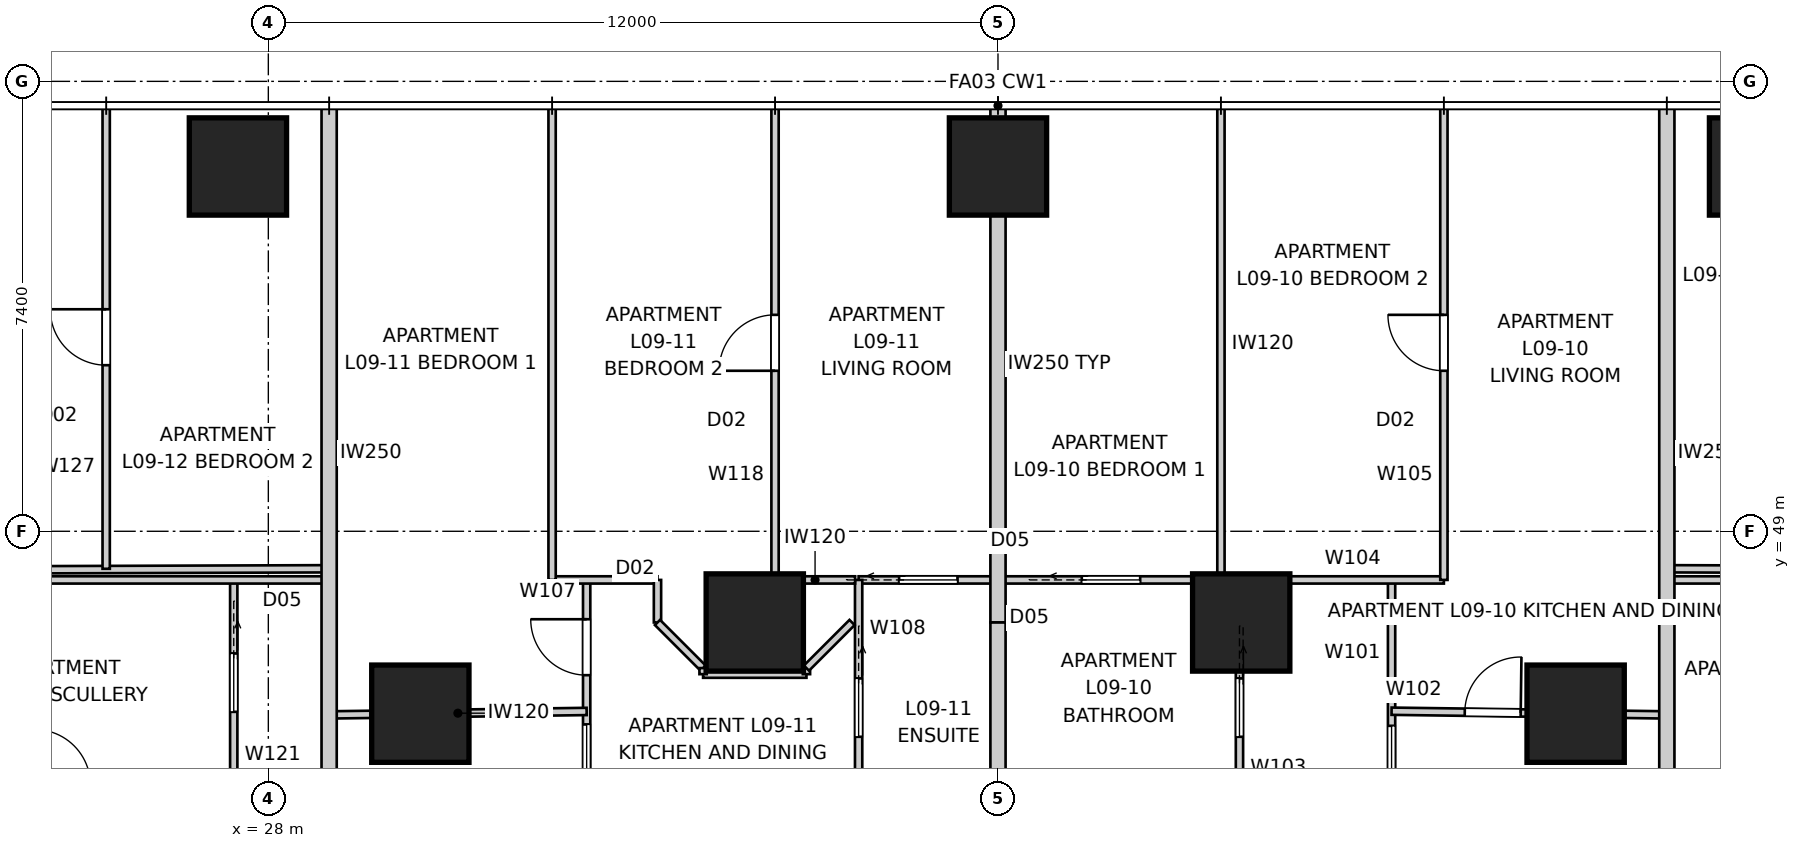
"""IFC4 building model, lengths in metres.
Left out: names, types, materials, properties, quantities, classifications, styles, units other than length and angle.
Written with IfcOpenShell. Run it as: python <this file> out.ifc"""

import sys

from ifc_helpers import new_model, si_unit, direction, frame, frame_2d, origin, origin_2d, place, context, subcontext, project, spatial, rectangle, extrude, element, fill, save


model = new_model("IFC4")
c1 = context("Model", 3, precision=1e-05, world=origin(), true_north=direction((0.0, 1.0)))
c2 = subcontext(c1, "Body", "Model", "MODEL_VIEW")
j1 = project(units=[si_unit("LENGTHUNIT", "METRE"), si_unit("PLANEANGLEUNIT", "RADIAN")], contexts=[c1])
p1 = place(None, origin())
s1 = spatial("IfcSite", under=j1, at=p1, CompositionType="ELEMENT")
p2 = place(p1, origin())
s2 = spatial("IfcBuilding", under=s1, at=p2, CompositionType="ELEMENT")
p3 = place(p2, frame((0.0, 0.0, 35.4)))
s3 = spatial("IfcBuildingStorey", under=s2, at=p3, CompositionType="ELEMENT", Elevation=35.4)
for number, where, z_axis, x_axis in (
    (1, (52.5, 55.0, 0.0), (0.0, 0.0, 1.0), (1.0, 0.0, 0.0)),
    (2, (40.0, 55.0, 0.0), (0.0, 0.0, 1.0), (1.0, 0.0, 0.0)),
    (3, (27.5, 55.0, 0.0), (0.0, 0.0, 1.0), (1.0, 0.0, 0.0)),
    (4, (49.5, 46.0, 0.0), (0.0, 0.0, 1.0), (1.0, 0.0, 0.0)),
    (5, (44.0, 47.5, 0.0), (0.0, 0.0, 1.0), (1.0, 0.0, 0.0)),
    (6, (36.0, 47.5, 0.0), (0.0, 0.0, 1.0), (1.0, 0.0, 0.0)),
    (7, (30.5, 46.0, 0.0), (0.0, 0.0, 1.0), (1.0, 0.0, 0.0)),
):
    element("IfcColumn", number, at=place(p3, frame(where, z_axis=z_axis, x_axis=x_axis)), inside=s3, PredefinedType="COLUMN", context=c2, shape_type="SweptSolid", body=[
        extrude(rectangle(XDim=1.6, YDim=1.6, at=origin_2d()), origin(), (0.0, 0.0, 1.0), 3.4),
    ])
for number, where, z_axis, x_axis in (
    (8, (51.0, 56.0, 0.0), (0.0, 0.0, 1.0), (0.0, -1.0, 0.0)),
    (9, (29.0, 56.0, 0.0), (0.0, 0.0, 1.0), (0.0, -1.0, 0.0)),
):
    element("IfcWall", number, at=place(p3, frame(where, z_axis=z_axis, x_axis=x_axis)), inside=s3, PredefinedType="PARTITIONING", context=c2, shape_type="SweptSolid", body=[
        extrude(rectangle(XDim=11.44, YDim=0.25, at=frame_2d((5.72, 0.0))), origin(), (0.0, 0.0, 1.0), 3.25),
    ])
p4 = place(p3, frame((40.0, 56.0, 0.0), z_axis=(0.0, 0.0, 1.0), x_axis=(0.0, -1.0, 0.0)))
e10 = element("IfcWall", 10, at=p4, inside=s3, PredefinedType="PARTITIONING", context=c2, shape_type="SweptSolid", body=[
    extrude(rectangle(XDim=8.5, YDim=0.25, at=frame_2d((4.25, 0.0))), origin(), (0.0, 0.0, 1.0), 3.25),
])
p5 = place(p3, frame((40.0, 47.5, 0.0), z_axis=(0.0, 0.0, 1.0), x_axis=(0.0, -1.0, 0.0)))
e11 = element("IfcWall", 11, at=p5, inside=s3, PredefinedType="PARTITIONING", context=c2, shape_type="SweptSolid", body=[
    extrude(rectangle(XDim=2.94, YDim=0.25, at=frame_2d((1.47, 0.0))), origin(), (0.0, 0.0, 1.0), 2.796),
])
p6 = place(p3, frame((51.0, 48.2, 0.0), z_axis=(0.0, 0.0, 1.0), x_axis=(1.0, 0.0, 0.0)))
e12 = element("IfcWall", 12, at=p6, inside=s3, PredefinedType="PARTITIONING", context=c2, shape_type="SweptSolid", body=[
    extrude(rectangle(XDim=7.2, YDim=0.12, at=frame_2d((3.6, 0.0))), origin(), (0.0, 0.0, 1.0), 3.25),
])
p7 = place(p3, frame((51.0, 48.383, 0.0), z_axis=(0.0, 0.0, 1.0), x_axis=(0.9999944038, -0.003345499915, 0.0)))
e13 = element("IfcWall", 13, at=p7, inside=s3, PredefinedType="PARTITIONING", context=c2, shape_type="SweptSolid", body=[
    extrude(rectangle(XDim=14.96, YDim=0.12, at=frame_2d((7.48, 0.0))), origin(), (0.0, 0.0, 1.0), 3.25),
])
p8 = place(p7, frame((12.515, 0.0, 0.0)))
e14 = element("IfcOpeningElement", 14, at=p8, cuts=e13, PredefinedType="OPENING", context=c2, shape_type="SweptSolid", body=[
    extrude(rectangle(XDim=0.92, YDim=2.34, at=frame_2d((0.46, 1.17))), frame((0.0, 0.07, 0.0), z_axis=(0.0, -1.0, 0.0), x_axis=(1.0, 0.0, 0.0)), (0.0, 0.0, 1.0), 0.14),
])
p9 = place(p7, frame((8.732, 0.0, 0.0)))
e15 = element("IfcOpeningElement", 15, at=p9, cuts=e13, PredefinedType="OPENING", context=c2, shape_type="SweptSolid", body=[
    extrude(rectangle(XDim=0.92, YDim=2.34, at=frame_2d((0.46, 1.17))), frame((0.0, 0.07, 0.0), z_axis=(0.0, -1.0, 0.0), x_axis=(1.0, 0.0, 0.0)), (0.0, 0.0, 1.0), 0.14),
])
p10 = place(p3, frame((46.473, 44.6, 0.0), z_axis=(0.0, 0.0, 1.0), x_axis=(0.0, 1.0, 0.0)))
e16 = element("IfcWall", 16, at=p10, inside=s3, PredefinedType="PARTITIONING", context=c2, shape_type="SweptSolid", body=[
    extrude(rectangle(XDim=3.6, YDim=0.12, at=frame_2d((1.8, 0.0))), origin(), (0.0, 0.0, 1.0), 3.25),
])
p11 = place(p10, frame((0.24, 0.0, 0.0)))
e17 = element("IfcOpeningElement", 17, at=p11, cuts=e16, PredefinedType="OPENING", context=c2, shape_type="SweptSolid", body=[
    extrude(rectangle(XDim=0.96, YDim=2.1, at=frame_2d((0.48, 1.05))), frame((0.0, 0.07, 0.0), z_axis=(0.0, -1.0, 0.0), x_axis=(1.0, 0.0, 0.0)), (0.0, 0.0, 1.0), 0.14),
])
p12 = place(p3, frame((46.473, 46.041, 0.0), z_axis=(0.0, 0.0, 1.0), x_axis=(0.999909127846, -0.013480951408, 0.0)))
e18 = element("IfcWall", 18, at=p12, inside=s3, PredefinedType="PARTITIONING", context=c2, shape_type="SweptSolid", body=[
    extrude(rectangle(XDim=4.528, YDim=0.12, at=frame_2d((2.264, 0.0))), origin(), (0.0, 0.0, 1.0), 2.549),
])
p13 = place(p12, frame((1.204, 0.0, 0.0)))
e19 = element("IfcOpeningElement", 19, at=p13, cuts=e18, PredefinedType="OPENING", context=c2, shape_type="SweptSolid", body=[
    extrude(rectangle(XDim=0.92, YDim=2.34, at=frame_2d((0.46, 1.17))), frame((0.0, 0.07, 0.0), z_axis=(0.0, -1.0, 0.0), x_axis=(1.0, 0.0, 0.0)), (0.0, 0.0, 1.0), 0.14),
])
p14 = place(p3, frame((43.971, 48.2, 0.0), z_axis=(0.0, 0.0, 1.0), x_axis=(0.0, -1.0, 0.0)))
e20 = element("IfcWall", 20, at=p14, inside=s3, PredefinedType="PARTITIONING", context=c2, shape_type="SweptSolid", body=[
    extrude(rectangle(XDim=3.6, YDim=0.12, at=frame_2d((1.8, 0.0))), origin(), (0.0, 0.0, 1.0), 3.25),
])
p15 = place(p14, frame((1.62, 0.0, 0.0)))
e21 = element("IfcOpeningElement", 21, at=p15, cuts=e20, PredefinedType="OPENING", context=c2, shape_type="SweptSolid", body=[
    extrude(rectangle(XDim=0.96, YDim=2.1, at=frame_2d((0.48, 1.05))), frame((0.0, 0.07, 0.0), z_axis=(0.0, -1.0, 0.0), x_axis=(1.0, 0.0, 0.0)), (0.0, 0.0, 1.0), 0.14),
])
p16 = place(p3, frame((37.708, 48.2, 0.0), z_axis=(0.0, 0.0, 1.0), x_axis=(1.0, 0.0, 0.0)))
e22 = element("IfcWall", 22, at=p16, inside=s3, PredefinedType="PARTITIONING", context=c2, shape_type="SweptSolid", body=[
    extrude(rectangle(XDim=9.625, YDim=0.12, at=frame_2d((4.812, 0.0))), origin(), (0.0, 0.0, 1.0), 3.25),
])
p17 = place(p16, frame((0.666, 0.0, 0.0)))
e23 = element("IfcOpeningElement", 23, at=p17, cuts=e22, PredefinedType="OPENING", context=c2, shape_type="SweptSolid", body=[
    extrude(rectangle(XDim=0.96, YDim=2.1, at=frame_2d((0.48, 1.05))), frame((0.0, 0.07, 0.0), z_axis=(0.0, -1.0, 0.0), x_axis=(1.0, 0.0, 0.0)), (0.0, 0.0, 1.0), 0.14),
])
p18 = place(p16, frame((3.67, 0.0, 0.0)))
e24 = element("IfcOpeningElement", 24, at=p18, cuts=e22, PredefinedType="OPENING", context=c2, shape_type="SweptSolid", body=[
    extrude(rectangle(XDim=0.96, YDim=2.1, at=frame_2d((0.48, 1.05))), frame((0.0, 0.07, 0.0), z_axis=(0.0, -1.0, 0.0), x_axis=(1.0, 0.0, 0.0)), (0.0, 0.0, 1.0), 0.14),
])
p19 = place(p3, frame((47.333, 48.2, 0.0), z_axis=(0.0, 0.0, 1.0), x_axis=(0.0, 1.0, 0.0)))
e25 = element("IfcWall", 25, at=p19, inside=s3, PredefinedType="PARTITIONING", context=c2, shape_type="SweptSolid", body=[
    extrude(rectangle(XDim=7.76, YDim=0.12, at=frame_2d((3.88, 0.0))), origin(), (0.0, 0.0, 1.0), 3.25),
])
p20 = place(p19, frame((3.44, 0.0, 0.0)))
e26 = element("IfcOpeningElement", 26, at=p20, cuts=e25, PredefinedType="OPENING", context=c2, shape_type="SweptSolid", body=[
    extrude(rectangle(XDim=0.92, YDim=2.34, at=frame_2d((0.46, 1.17))), frame((0.0, 0.07, 0.0), z_axis=(0.0, -1.0, 0.0), x_axis=(1.0, 0.0, 0.0)), (0.0, 0.0, 1.0), 0.14),
])
p21 = place(p3, frame((43.667, 55.96, 0.0), z_axis=(0.0, 0.0, 1.0), x_axis=(0.0, -1.0, 0.0)))
e27 = element("IfcWall", 27, at=p21, inside=s3, PredefinedType="PARTITIONING", context=c2, shape_type="SweptSolid", body=[
    extrude(rectangle(XDim=7.76, YDim=0.12, at=frame_2d((3.88, 0.0))), origin(), (0.0, 0.0, 1.0), 3.25),
])
p22 = place(p3, frame((33.235, 44.6, 0.0), z_axis=(0.0, 0.0, 1.0), x_axis=(0.0, 1.0, 0.0)))
e28 = element("IfcWall", 28, at=p22, inside=s3, PredefinedType="PARTITIONING", context=c2, shape_type="SweptSolid", body=[
    extrude(rectangle(XDim=3.6, YDim=0.12, at=frame_2d((1.8, 0.0))), origin(), (0.0, 0.0, 1.0), 3.25),
])
p23 = place(p22, frame((2.033, 0.0, 0.0)))
e29 = element("IfcOpeningElement", 29, at=p23, cuts=e28, PredefinedType="OPENING", context=c2, shape_type="SweptSolid", body=[
    extrude(rectangle(XDim=0.92, YDim=2.34, at=frame_2d((0.46, 1.17))), frame((0.0, 0.07, 0.0), z_axis=(0.0, -1.0, 0.0), x_axis=(1.0, 0.0, 0.0)), (0.0, 0.0, 1.0), 0.14),
])
p24 = place(p22, frame((0.263, 0.0, 0.0)))
e30 = element("IfcOpeningElement", 30, at=p24, cuts=e28, PredefinedType="OPENING", context=c2, shape_type="SweptSolid", body=[
    extrude(rectangle(XDim=0.96, YDim=2.1, at=frame_2d((0.48, 1.05))), frame((0.0, 0.07, 0.0), z_axis=(0.0, -1.0, 0.0), x_axis=(1.0, 0.0, 0.0)), (0.0, 0.0, 1.0), 0.14),
])
p25 = place(p3, frame((37.708, 48.2, 0.0), z_axis=(0.0, 0.0, 1.0), x_axis=(0.0, -1.0, 0.0)))
e31 = element("IfcWall", 31, at=p25, inside=s3, PredefinedType="PARTITIONING", context=c2, shape_type="SweptSolid", body=[
    extrude(rectangle(XDim=3.6, YDim=0.12, at=frame_2d((1.8, 0.0))), origin(), (0.0, 0.0, 1.0), 3.25),
])
p26 = place(p25, frame((1.62, 0.0, 0.0)))
e32 = element("IfcOpeningElement", 32, at=p26, cuts=e31, PredefinedType="OPENING", context=c2, shape_type="SweptSolid", body=[
    extrude(rectangle(XDim=0.96, YDim=2.1, at=frame_2d((0.48, 1.05))), frame((0.0, 0.07, 0.0), z_axis=(0.0, -1.0, 0.0), x_axis=(1.0, 0.0, 0.0)), (0.0, 0.0, 1.0), 0.14),
])
p27 = place(p3, frame((32.667, 48.2, 0.0), z_axis=(0.0, 0.0, 1.0), x_axis=(1.0, 0.0, 0.0)))
e33 = element("IfcWall", 33, at=p27, inside=s3, PredefinedType="PARTITIONING", context=c2, shape_type="SweptSolid", body=[
    extrude(rectangle(XDim=1.733, YDim=0.12, at=frame_2d((0.867, 0.0))), origin(), (0.0, 0.0, 1.0), 3.25),
])
p28 = place(p3, frame((34.4, 48.2, 0.0), z_axis=(0.0, 0.0, 1.0), x_axis=(0.0, -1.0, 0.0)))
e34 = element("IfcWall", 34, at=p28, inside=s3, PredefinedType="PARTITIONING", context=c2, shape_type="SweptSolid", body=[
    extrude(rectangle(XDim=0.7, YDim=0.12, at=frame_2d((0.35, 0.0))), origin(), (0.0, 0.0, 1.0), 3.25),
])
p29 = place(p3, frame((34.4, 47.5, 0.0), z_axis=(0.0, 0.0, 1.0), x_axis=(0.707106781187, -0.707106781187, 0.0)))
e35 = element("IfcWall", 35, at=p29, inside=s3, PredefinedType="PARTITIONING", context=c2, shape_type="SweptSolid", body=[
    extrude(rectangle(XDim=1.061, YDim=0.12, at=frame_2d((0.53, 0.0))), origin(), (0.0, 0.0, 1.0), 3.25),
])
p30 = place(p3, frame((35.15, 46.65, 0.0), z_axis=(0.0, 0.0, 1.0), x_axis=(1.0, 0.0, 0.0)))
e36 = element("IfcWall", 36, at=p30, inside=s3, PredefinedType="PARTITIONING", context=c2, shape_type="SweptSolid", body=[
    extrude(rectangle(XDim=1.7, YDim=0.12, at=frame_2d((0.85, 0.0))), origin(), (0.0, 0.0, 1.0), 3.25),
])
p31 = place(p3, frame((36.85, 46.75, 0.0), z_axis=(0.0, 0.0, 1.0), x_axis=(0.707106781187, 0.707106781187, 0.0)))
e37 = element("IfcWall", 37, at=p31, inside=s3, PredefinedType="PARTITIONING", context=c2, shape_type="SweptSolid", body=[
    extrude(rectangle(XDim=1.061, YDim=0.12, at=frame_2d((0.53, 0.0))), origin(), (0.0, 0.0, 1.0), 3.25),
])
p32 = place(p3, frame((29.0, 45.98, 0.0), z_axis=(0.0, 0.0, 1.0), x_axis=(0.999909030942, 0.01348813704, 0.0)))
e38 = element("IfcWall", 38, at=p32, inside=s3, PredefinedType="PARTITIONING", context=c2, shape_type="SweptSolid", body=[
    extrude(rectangle(XDim=4.236, YDim=0.12, at=frame_2d((2.118, 0.0))), origin(), (0.0, 0.0, 1.0), 2.549),
])
p33 = place(p3, frame((37.65, 48.2, 0.0), z_axis=(0.0, 0.0, 1.0), x_axis=(-1.0, 0.0, 0.0)))
e39 = element("IfcWall", 39, at=p33, inside=s3, PredefinedType="PARTITIONING", context=c2, shape_type="SweptSolid", body=[
    extrude(rectangle(XDim=1.317, YDim=0.12, at=frame_2d((0.658, 0.0))), origin(), (0.0, 0.0, 1.0), 3.25),
])
p34 = place(p3, frame((36.333, 48.2, 0.0), z_axis=(0.0, 0.0, 1.0), x_axis=(0.0, 1.0, 0.0)))
e40 = element("IfcWall", 40, at=p34, inside=s3, PredefinedType="PARTITIONING", context=c2, shape_type="SweptSolid", body=[
    extrude(rectangle(XDim=7.76, YDim=0.12, at=frame_2d((3.88, 0.0))), origin(), (0.0, 0.0, 1.0), 3.25),
])
p35 = place(p34, frame((3.44, 0.0, 0.0)))
e41 = element("IfcOpeningElement", 41, at=p35, cuts=e40, PredefinedType="OPENING", context=c2, shape_type="SweptSolid", body=[
    extrude(rectangle(XDim=0.92, YDim=2.34, at=frame_2d((0.46, 1.17))), frame((0.0, 0.07, 0.0), z_axis=(0.0, -1.0, 0.0), x_axis=(1.0, 0.0, 0.0)), (0.0, 0.0, 1.0), 0.14),
])
p36 = place(p3, frame((32.667, 55.96, 0.0), z_axis=(0.0, 0.0, 1.0), x_axis=(0.0, -1.0, 0.0)))
e42 = element("IfcWall", 42, at=p36, inside=s3, PredefinedType="PARTITIONING", context=c2, shape_type="SweptSolid", body=[
    extrude(rectangle(XDim=7.76, YDim=0.12, at=frame_2d((3.88, 0.0))), origin(), (0.0, 0.0, 1.0), 3.25),
])
p37 = place(p3, frame((27.431, 48.2, 0.0), z_axis=(0.0, 0.0, 1.0), x_axis=(0.0, -1.0, 0.0)))
e43 = element("IfcWall", 43, at=p37, inside=s3, PredefinedType="PARTITIONING", context=c2, shape_type="SweptSolid", body=[
    extrude(rectangle(XDim=3.6, YDim=0.12, at=frame_2d((1.8, 0.0))), origin(), (0.0, 0.0, 1.0), 3.25),
])
p38 = place(p37, frame((1.209, 0.0, 0.0)))
e44 = element("IfcOpeningElement", 44, at=p38, cuts=e43, PredefinedType="OPENING", context=c2, shape_type="SweptSolid", body=[
    extrude(rectangle(XDim=0.96, YDim=2.1, at=frame_2d((0.48, 1.05))), frame((0.0, 0.07, 0.0), z_axis=(0.0, -1.0, 0.0), x_axis=(1.0, 0.0, 0.0)), (0.0, 0.0, 1.0), 0.14),
])
p39 = place(p3, frame((21.8, 48.2, 0.0), z_axis=(0.0, 0.0, 1.0), x_axis=(1.0, 0.0, 0.0)))
e45 = element("IfcWall", 45, at=p39, inside=s3, PredefinedType="PARTITIONING", context=c2, shape_type="SweptSolid", body=[
    extrude(rectangle(XDim=7.2, YDim=0.12, at=frame_2d((3.6, 0.0))), origin(), (0.0, 0.0, 1.0), 3.25),
])
p40 = place(p3, frame((14.04, 48.333, 0.0), z_axis=(0.0, 0.0, 1.0), x_axis=(0.9999944038, 0.003345499915, 0.0)))
e46 = element("IfcWall", 46, at=p40, inside=s3, PredefinedType="PARTITIONING", context=c2, shape_type="SweptSolid", body=[
    extrude(rectangle(XDim=14.96, YDim=0.12, at=frame_2d((7.48, 0.0))), origin(), (0.0, 0.0, 1.0), 3.25),
])
p41 = place(p40, frame((3.333, 0.0, 0.0)))
e47 = element("IfcOpeningElement", 47, at=p41, cuts=e46, PredefinedType="OPENING", context=c2, shape_type="SweptSolid", body=[
    extrude(rectangle(XDim=0.92, YDim=2.34, at=frame_2d((0.46, 1.17))), frame((0.0, 0.07, 0.0), z_axis=(0.0, -1.0, 0.0), x_axis=(1.0, 0.0, 0.0)), (0.0, 0.0, 1.0), 0.14),
])
p42 = place(p3, frame((25.333, 48.383, 0.0), z_axis=(0.0, 0.0, 1.0), x_axis=(0.0, 1.0, 0.0)))
e48 = element("IfcWall", 48, at=p42, inside=s3, PredefinedType="PARTITIONING", context=c2, shape_type="SweptSolid", body=[
    extrude(rectangle(XDim=7.577, YDim=0.12, at=frame_2d((3.788, 0.0))), origin(), (0.0, 0.0, 1.0), 2.638),
])
p43 = place(p42, frame((3.348, 0.0, 0.0)))
e49 = element("IfcOpeningElement", 49, at=p43, cuts=e48, PredefinedType="OPENING", context=c2, shape_type="SweptSolid", body=[
    extrude(rectangle(XDim=0.92, YDim=2.34, at=frame_2d((0.46, 1.17))), frame((0.0, 0.07, 0.0), z_axis=(0.0, -1.0, 0.0), x_axis=(1.0, 0.0, 0.0)), (0.0, 0.0, 1.0), 0.14),
])
for number, where, z_axis, x_axis in (
    (50, (35.15, 46.65, 0.0), (0.0, 0.0, 1.0), (0.0, 1.0, 0.0)),
    (51, (36.85, 46.65, 0.0), (0.0, 0.0, 1.0), (0.0, 1.0, 0.0)),
):
    element("IfcWall", number, at=place(p3, frame(where, z_axis=z_axis, x_axis=x_axis)), inside=s3, PredefinedType="PARTITIONING", context=c2, shape_type="SweptSolid", body=[
        extrude(rectangle(XDim=0.1, YDim=0.12, at=frame_2d((0.05, 0.0))), origin(), (0.0, 0.0, 1.0), 3.25),
    ])
p44 = place(p13, origin())
e52 = element("IfcDoor", 52, at=p44, inside=s3, OperationType="SINGLE_SWING_RIGHT", PredefinedType="DOOR", context=c2, shape_type="SweptSolid", body=[
    extrude(rectangle(XDim=0.92, YDim=2.34, at=frame_2d((0.46, 1.17))), frame((0.0, 0.025, 0.0), z_axis=(0.0, -1.0, 0.0), x_axis=(1.0, 0.0, 0.0)), (0.0, 0.0, 1.0), 0.05),
])
fill(e19, e52)
p45 = place(p11, origin())
e53 = element("IfcDoor", 53, at=p45, inside=s3, OperationType="SLIDING_TO_LEFT", PredefinedType="DOOR", context=c2, shape_type="SweptSolid", body=[
    extrude(rectangle(XDim=0.96, YDim=2.1, at=frame_2d((0.48, 1.05))), frame((0.0, 0.025, 0.0), z_axis=(0.0, -1.0, 0.0), x_axis=(1.0, 0.0, 0.0)), (0.0, 0.0, 1.0), 0.05),
])
fill(e17, e53)
p46 = place(p26, origin())
e54 = element("IfcDoor", 54, at=p46, inside=s3, OperationType="SLIDING_TO_LEFT", PredefinedType="DOOR", context=c2, shape_type="SweptSolid", body=[
    extrude(rectangle(XDim=0.96, YDim=2.1, at=frame_2d((0.48, 1.05))), frame((0.0, 0.025, 0.0), z_axis=(0.0, -1.0, 0.0), x_axis=(1.0, 0.0, 0.0)), (0.0, 0.0, 1.0), 0.05),
])
fill(e32, e54)
p47 = place(p23, origin())
e55 = element("IfcDoor", 55, at=p47, inside=s3, OperationType="SINGLE_SWING_RIGHT", PredefinedType="DOOR", context=c2, shape_type="SweptSolid", body=[
    extrude(rectangle(XDim=0.92, YDim=2.34, at=frame_2d((0.46, 1.17))), frame((0.0, 0.025, 0.0), z_axis=(0.0, -1.0, 0.0), x_axis=(1.0, 0.0, 0.0)), (0.0, 0.0, 1.0), 0.05),
])
fill(e29, e55)
p48 = place(p24, origin())
e56 = element("IfcDoor", 56, at=p48, inside=s3, OperationType="SLIDING_TO_LEFT", PredefinedType="DOOR", context=c2, shape_type="SweptSolid", body=[
    extrude(rectangle(XDim=0.96, YDim=2.1, at=frame_2d((0.48, 1.05))), frame((0.0, 0.025, 0.0), z_axis=(0.0, -1.0, 0.0), x_axis=(1.0, 0.0, 0.0)), (0.0, 0.0, 1.0), 0.05),
])
fill(e30, e56)
p49 = place(p20, origin())
e57 = element("IfcDoor", 57, at=p49, inside=s3, OperationType="SINGLE_SWING_RIGHT", PredefinedType="DOOR", context=c2, shape_type="SweptSolid", body=[
    extrude(rectangle(XDim=0.92, YDim=2.34, at=frame_2d((0.46, 1.17))), frame((0.0, 0.025, 0.0), z_axis=(0.0, -1.0, 0.0), x_axis=(1.0, 0.0, 0.0)), (0.0, 0.0, 1.0), 0.05),
])
fill(e26, e57)
p50 = place(p15, origin())
e58 = element("IfcDoor", 58, at=p50, inside=s3, OperationType="SLIDING_TO_LEFT", PredefinedType="DOOR", context=c2, shape_type="SweptSolid", body=[
    extrude(rectangle(XDim=0.96, YDim=2.1, at=frame_2d((0.48, 1.05))), frame((0.0, 0.025, 0.0), z_axis=(0.0, -1.0, 0.0), x_axis=(1.0, 0.0, 0.0)), (0.0, 0.0, 1.0), 0.05),
])
fill(e21, e58)
p51 = place(p17, origin())
e59 = element("IfcDoor", 59, at=p51, inside=s3, OperationType="SLIDING_TO_LEFT", PredefinedType="DOOR", context=c2, shape_type="SweptSolid", body=[
    extrude(rectangle(XDim=0.96, YDim=2.1, at=frame_2d((0.48, 1.05))), frame((0.0, 0.025, 0.0), z_axis=(0.0, -1.0, 0.0), x_axis=(1.0, 0.0, 0.0)), (0.0, 0.0, 1.0), 0.05),
])
fill(e23, e59)
p52 = place(p38, origin())
e60 = element("IfcDoor", 60, at=p52, inside=s3, OperationType="SLIDING_TO_LEFT", PredefinedType="DOOR", context=c2, shape_type="SweptSolid", body=[
    extrude(rectangle(XDim=0.96, YDim=2.1, at=frame_2d((0.48, 1.05))), frame((0.0, 0.025, 0.0), z_axis=(0.0, -1.0, 0.0), x_axis=(1.0, 0.0, 0.0)), (0.0, 0.0, 1.0), 0.05),
])
fill(e44, e60)
p53 = place(p18, origin())
e61 = element("IfcDoor", 61, at=p53, inside=s3, OperationType="SLIDING_TO_LEFT", PredefinedType="DOOR", context=c2, shape_type="SweptSolid", body=[
    extrude(rectangle(XDim=0.96, YDim=2.1, at=frame_2d((0.48, 1.05))), frame((0.0, 0.025, 0.0), z_axis=(0.0, -1.0, 0.0), x_axis=(1.0, 0.0, 0.0)), (0.0, 0.0, 1.0), 0.05),
])
fill(e24, e61)
p54 = place(p35, origin())
e62 = element("IfcDoor", 62, at=p54, inside=s3, OperationType="SINGLE_SWING_LEFT", PredefinedType="DOOR", context=c2, shape_type="SweptSolid", body=[
    extrude(rectangle(XDim=0.92, YDim=2.34, at=frame_2d((0.46, 1.17))), frame((0.0, 0.025, 0.0), z_axis=(0.0, -1.0, 0.0), x_axis=(1.0, 0.0, 0.0)), (0.0, 0.0, 1.0), 0.05),
])
fill(e41, e62)
p55 = place(p43, origin())
e63 = element("IfcDoor", 63, at=p55, inside=s3, OperationType="SINGLE_SWING_RIGHT", PredefinedType="DOOR", context=c2, shape_type="SweptSolid", body=[
    extrude(rectangle(XDim=0.92, YDim=2.34, at=frame_2d((0.46, 1.17))), frame((0.0, 0.025, 0.0), z_axis=(0.0, -1.0, 0.0), x_axis=(1.0, 0.0, 0.0)), (0.0, 0.0, 1.0), 0.05),
])
fill(e49, e63)
save(model, sys.argv[1])
